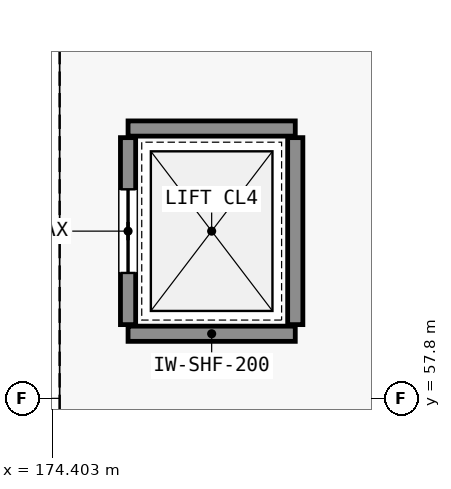
"""IFC4 building model, lengths in metres.
Left out: names, types, materials, properties, quantities, classifications, styles, units other than length and angle.
Written with IfcOpenShell. Run it as: python <this file> out.ifc"""

import sys

from ifc_helpers import new_model, si_unit, direction, frame, frame_2d, origin, place, context, subcontext, project, spatial, rectangle, extrude, element, fill, save


model = new_model("IFC4")
c1 = context("Model", 3, precision=1e-05, world=origin(), true_north=direction((0.0, 1.0)))
c2 = subcontext(c1, "Body", "Model", "MODEL_VIEW")
j1 = project(units=[si_unit("LENGTHUNIT", "METRE"), si_unit("PLANEANGLEUNIT", "RADIAN")], contexts=[c1])
p1 = place(None, origin())
s1 = spatial("IfcSite", under=j1, at=p1, CompositionType="ELEMENT")
p2 = place(p1, origin())
s2 = spatial("IfcBuilding", under=s1, at=p2, CompositionType="ELEMENT")
p3 = place(p2, frame((0.0, 0.0, 11.4)))
s3 = spatial("IfcBuildingStorey", under=s2, at=p3, CompositionType="ELEMENT", Elevation=11.4)
for number, where, z_axis, x_axis in (
    (1, (175.4, 58.65, 0.0), (0.0, 0.0, 1.0), (1.0, 0.0, 0.0)),
    (2, (175.4, 61.35, 0.0), (0.0, 0.0, 1.0), (1.0, 0.0, 0.0)),
):
    element("IfcWall", number, at=place(p3, frame(where, z_axis=z_axis, x_axis=x_axis)), inside=s3, PredefinedType="STANDARD", context=c2, shape_type="SweptSolid", body=[
        extrude(rectangle(XDim=2.2, YDim=0.2, at=frame_2d((1.1, 0.0))), origin(), (0.0, 0.0, 1.0), 3.787),
    ])
p4 = place(p3, frame((175.4, 58.77, 0.0), z_axis=(0.0, 0.0, 1.0), x_axis=(0.0, 1.0, 0.0)))
e3 = element("IfcWall", 3, at=p4, inside=s3, PredefinedType="STANDARD", context=c2, shape_type="SweptSolid", body=[
    extrude(rectangle(XDim=2.46, YDim=0.2, at=frame_2d((1.23, 0.0))), origin(), (0.0, 0.0, 1.0), 4.48),
])
p5 = place(p4, frame((0.68, 0.0, 0.0)))
e4 = element("IfcOpeningElement", 4, at=p5, cuts=e3, PredefinedType="OPENING", context=c2, shape_type="SweptSolid", body=[
    extrude(rectangle(XDim=1.1, YDim=2.15, at=frame_2d((0.55, 1.075))), frame((0.0, 0.11, 0.0), z_axis=(0.0, -1.0, 0.0), x_axis=(1.0, 0.0, 0.0)), (0.0, 0.0, 1.0), 0.22),
])
p6 = place(p3, frame((177.6, 58.77, 0.0), z_axis=(0.0, 0.0, 1.0), x_axis=(0.0, 1.0, 0.0)))
e5 = element("IfcWall", 5, at=p6, inside=s3, PredefinedType="STANDARD", context=c2, shape_type="SweptSolid", body=[
    extrude(rectangle(XDim=2.46, YDim=0.2, at=frame_2d((1.23, 0.0))), origin(), (0.0, 0.0, 1.0), 4.48),
])
p7 = place(p5, origin())
e6 = element("IfcDoor", 6, at=p7, inside=s3, OperationType="SLIDING_TO_LEFT", PredefinedType="DOOR", context=c2, shape_type="SweptSolid", body=[
    extrude(rectangle(XDim=1.1, YDim=2.15, at=frame_2d((0.55, 1.075))), frame((0.0, 0.025, 0.0), z_axis=(0.0, -1.0, 0.0), x_axis=(1.0, 0.0, 0.0)), (0.0, 0.0, 1.0), 0.05),
])
fill(e4, e6)
save(model, sys.argv[1])
